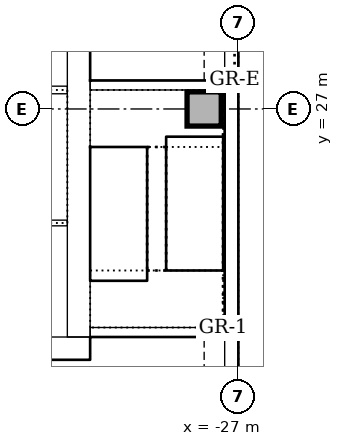
"""IFC4 building model, lengths in metres.
Left out: names, types, materials, properties, quantities, classifications, styles, units other than length and angle.
Written with IfcOpenShell. Run it as: python <this file> out.ifc"""

import sys

from ifc_helpers import new_model, si_unit, direction, frame, frame_2d, origin, origin_2d, place, context, subcontext, project, spatial, rectangle, extrude, element, fill, save


model = new_model("IFC4")
c1 = context("Model", 3, precision=1e-05, world=origin(), true_north=direction((0.0, 1.0)))
c2 = subcontext(c1, "Body", "Model", "MODEL_VIEW")
j1 = project(units=[si_unit("LENGTHUNIT", "METRE"), si_unit("PLANEANGLEUNIT", "RADIAN")], contexts=[c1])
p1 = place(None, origin())
s1 = spatial("IfcSite", under=j1, at=p1, CompositionType="ELEMENT")
p2 = place(p1, origin())
s2 = spatial("IfcBuilding", under=s1, at=p2, CompositionType="ELEMENT")
p3 = place(p2, frame((0.0, 0.0, 26.0)))
s3 = spatial("IfcBuildingStorey", under=s2, at=p3, CompositionType="ELEMENT", Elevation=26.0)
p4 = place(p3, frame((-42.6, 20.7, 0.0), z_axis=(0.0, 0.0, 1.0), x_axis=(1.0, 0.0, 0.0)))
e1 = element("IfcWall", 1, at=p4, inside=s3, PredefinedType="SOLIDWALL", context=c2, shape_type="SweptSolid", body=[
    extrude(rectangle(XDim=11.7, YDim=0.6, at=frame_2d((5.85, 0.0))), origin(), (0.0, 0.0, 1.0), 4.0),
])
p5 = place(p3, frame((-31.2, 21.0, 0.0), z_axis=(0.0, 0.0, 1.0), x_axis=(0.0, 1.0, 0.0)))
e2 = element("IfcWall", 2, at=p5, inside=s3, PredefinedType="SOLIDWALL", context=c2, shape_type="SweptSolid", body=[
    extrude(rectangle(XDim=9.5, YDim=0.6, at=frame_2d((4.75, 0.0))), origin(), (0.0, 0.0, 1.0), 4.0),
])
p6 = place(p5, frame((5.25, 0.0, 0.0)))
e3 = element("IfcOpeningElement", 3, at=p6, cuts=e2, PredefinedType="OPENING", context=c2, shape_type="SweptSolid", body=[
    extrude(rectangle(XDim=1.0, YDim=2.1, at=frame_2d((0.5, 1.05))), frame((0.0, 0.31, 0.0), z_axis=(0.0, -1.0, 0.0), x_axis=(1.0, 0.0, 0.0)), (0.0, 0.0, 1.0), 0.62),
])
p7 = place(p3, frame((-30.9, 21.125, 0.0), z_axis=(0.0, 0.0, 1.0), x_axis=(1.0, 0.0, 0.0)))
e4 = element("IfcWall", 4, at=p7, inside=s3, PredefinedType="SOLIDWALL", context=c2, shape_type="SweptSolid", body=[
    extrude(rectangle(XDim=3.54, YDim=0.25, at=frame_2d((1.77, 0.0))), origin(), (0.0, 0.0, 1.0), 4.0),
])
p8 = place(p3, frame((-27.36, 27.625, 0.0), z_axis=(0.0, 0.0, 1.0), x_axis=(-1.0, 0.0, 0.0)))
e5 = element("IfcWall", 5, at=p8, inside=s3, PredefinedType="SOLIDWALL", context=c2, shape_type="SweptSolid", body=[
    extrude(rectangle(XDim=3.54, YDim=0.25, at=frame_2d((1.77, 0.0))), origin(), (0.0, 0.0, 1.0), 4.0),
])
p9 = place(p8, frame((1.69, 0.0, 0.0)))
e6 = element("IfcOpeningElement", 6, at=p9, cuts=e5, PredefinedType="OPENING", context=c2, shape_type="SweptSolid", body=[
    extrude(rectangle(XDim=1.1, YDim=2.1, at=frame_2d((0.55, 1.05))), frame((0.0, 0.135, 0.0), z_axis=(0.0, -1.0, 0.0), x_axis=(1.0, 0.0, 0.0)), (0.0, 0.0, 1.0), 0.27),
])
p10 = place(p3, frame((-27.9, 27.0, 0.0), z_axis=(0.0, 0.0, 1.0), x_axis=(1.0, 0.0, 0.0)))
e7 = element("IfcColumn", 7, at=p10, inside=s3, PredefinedType="COLUMN", context=c2, shape_type="SweptSolid", body=[
    extrude(rectangle(XDim=0.9, YDim=0.9, at=origin_2d()), origin(), (0.0, 0.0, 1.0), 4.0),
])
p11 = place(p3, frame((-27.18, 8.743, 0.0), z_axis=(0.0, 0.0, 1.0), x_axis=(0.0, 1.0, 0.0)))
e8 = element("IfcWall", 8, at=p11, inside=s3, PredefinedType="STANDARD", context=c2, shape_type="SweptSolid", body=[
    extrude(rectangle(XDim=12.257, YDim=0.36, at=frame_2d((6.129, 0.0))), origin(), (0.0, 0.0, 1.0), 3.85),
])
p12 = place(p11, frame((2.607, 0.0, 0.9)))
e9 = element("IfcOpeningElement", 9, at=p12, cuts=e8, PredefinedType="OPENING", context=c2, shape_type="SweptSolid", body=[
    extrude(rectangle(XDim=3.3, YDim=1.6, at=frame_2d((1.65, 0.8))), frame((0.0, 0.19, 0.0), z_axis=(0.0, -1.0, 0.0), x_axis=(1.0, 0.0, 0.0)), (0.0, 0.0, 1.0), 0.38),
])
p13 = place(p11, frame((7.607, 0.0, 0.9)))
e10 = element("IfcOpeningElement", 10, at=p13, cuts=e8, PredefinedType="OPENING", context=c2, shape_type="SweptSolid", body=[
    extrude(rectangle(XDim=3.3, YDim=1.6, at=frame_2d((1.65, 0.8))), frame((0.0, 0.19, 0.0), z_axis=(0.0, -1.0, 0.0), x_axis=(1.0, 0.0, 0.0)), (0.0, 0.0, 1.0), 0.38),
])
p14 = place(p3, frame((-27.18, 21.0, 0.0), z_axis=(0.0, 0.0, 1.0), x_axis=(0.0, 1.0, 0.0)))
e11 = element("IfcWall", 11, at=p14, inside=s3, PredefinedType="STANDARD", context=c2, shape_type="SweptSolid", body=[
    extrude(rectangle(XDim=6.75, YDim=0.36, at=frame_2d((3.375, 0.0))), origin(), (0.0, 0.0, 1.0), 3.85),
])
p15 = place(p3, frame((-27.18, 27.75, 0.0), z_axis=(0.0, 0.0, 1.0), x_axis=(0.0, 1.0, 0.0)))
e12 = element("IfcWall", 12, at=p15, inside=s3, PredefinedType="STANDARD", context=c2, shape_type="SweptSolid", body=[
    extrude(rectangle(XDim=7.5, YDim=0.36, at=frame_2d((3.75, 0.0))), origin(), (0.0, 0.0, 1.0), 3.85),
])
p16 = place(p15, frame((2.85, 0.0, 1.2)))
e13 = element("IfcOpeningElement", 13, at=p16, cuts=e12, PredefinedType="OPENING", context=c2, shape_type="SweptSolid", body=[
    extrude(rectangle(XDim=1.8, YDim=1.2, at=frame_2d((0.9, 0.6))), frame((0.0, 0.19, 0.0), z_axis=(0.0, -1.0, 0.0), x_axis=(1.0, 0.0, 0.0)), (0.0, 0.0, 1.0), 0.38),
])
p17 = place(p3, frame((-34.9, 27.5, 0.0), z_axis=(0.0, 0.0, 1.0), x_axis=(1.0, 0.0, 0.0)))
e14 = element("IfcWall", 14, at=p17, inside=s3, PredefinedType="SOLIDWALL", context=c2, shape_type="SweptSolid", body=[
    extrude(rectangle(XDim=3.4, YDim=0.2, at=frame_2d((1.7, 0.0))), origin(), (0.0, 0.0, 1.0), 4.0),
])
p18 = place(p17, frame((1.1, 0.0, 0.0)))
e15 = element("IfcOpeningElement", 15, at=p18, cuts=e14, PredefinedType="OPENING", context=c2, shape_type="SweptSolid", body=[
    extrude(rectangle(XDim=1.1, YDim=2.1, at=frame_2d((0.55, 1.05))), frame((0.0, 0.11, 0.0), z_axis=(0.0, -1.0, 0.0), x_axis=(1.0, 0.0, 0.0)), (0.0, 0.0, 1.0), 0.22),
])
p19 = place(p3, frame((-31.5, 24.0, 0.0), z_axis=(0.0, 0.0, 1.0), x_axis=(-1.0, 0.0, 0.0)))
e16 = element("IfcWall", 16, at=p19, inside=s3, PredefinedType="SOLIDWALL", context=c2, shape_type="SweptSolid", body=[
    extrude(rectangle(XDim=3.4, YDim=0.15, at=frame_2d((1.7, 0.0))), origin(), (0.0, 0.0, 1.0), 4.0),
])
p20 = place(p6, frame((1.0, 0.0, 0.0), z_axis=(0.0, 0.0, 1.0), x_axis=(-1.0, 0.0, 0.0)))
e17 = element("IfcDoor", 17, at=p20, inside=s3, OperationType="SINGLE_SWING_LEFT", PredefinedType="DOOR", context=c2, shape_type="SweptSolid", body=[
    extrude(rectangle(XDim=1.0, YDim=2.1, at=frame_2d((0.5, 1.05))), frame((0.0, 0.025, 0.0), z_axis=(0.0, -1.0, 0.0), x_axis=(1.0, 0.0, 0.0)), (0.0, 0.0, 1.0), 0.05),
])
fill(e3, e17)
p21 = place(p9, origin())
e18 = element("IfcDoor", 18, at=p21, inside=s3, OperationType="SINGLE_SWING_RIGHT", PredefinedType="DOOR", context=c2, shape_type="SweptSolid", body=[
    extrude(rectangle(XDim=1.1, YDim=2.1, at=frame_2d((0.55, 1.05))), frame((0.0, 0.025, 0.0), z_axis=(0.0, -1.0, 0.0), x_axis=(1.0, 0.0, 0.0)), (0.0, 0.0, 1.0), 0.05),
])
fill(e6, e18)
save(model, sys.argv[1])
